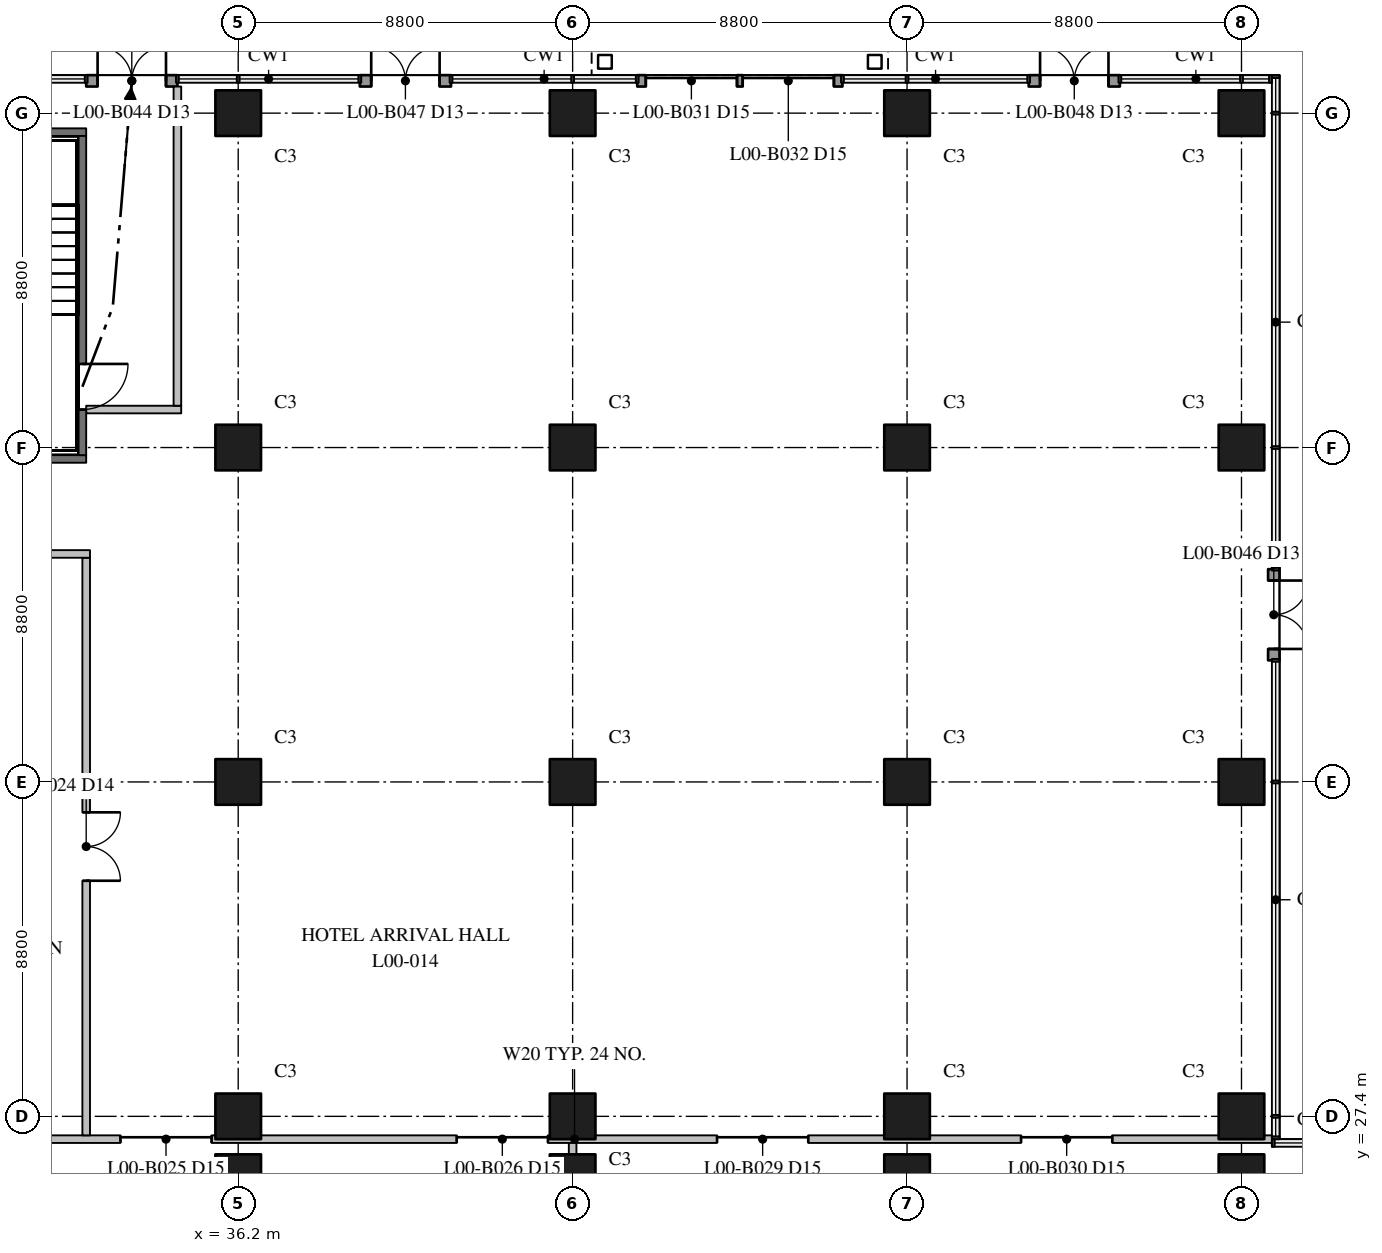
"""IFC4 building model, lengths in metres.
Left out: names, types, materials, properties, quantities, classifications, styles, units other than length and angle.
Written with IfcOpenShell. Run it as: python <this file> out.ifc"""

import sys

from ifc_helpers import new_model, si_unit, direction, frame, frame_2d, origin, origin_2d, place, context, subcontext, project, spatial, rectangle, hollow_rectangle, extrude, element, fill, save


model = new_model("IFC4")
c1 = context("Model", 3, precision=1e-05, world=origin(), true_north=direction((0.0, 1.0)))
c2 = subcontext(c1, "Body", "Model", "MODEL_VIEW")
j1 = project(units=[si_unit("LENGTHUNIT", "METRE"), si_unit("PLANEANGLEUNIT", "RADIAN")], contexts=[c1])
p1 = place(None, origin())
s1 = spatial("IfcSite", under=j1, at=p1, CompositionType="ELEMENT")
p2 = place(p1, origin())
s2 = spatial("IfcBuilding", under=s1, at=p2, CompositionType="ELEMENT")
p3 = place(p2, origin())
s3 = spatial("IfcBuildingStorey", under=s2, at=p3, CompositionType="ELEMENT", Elevation=0.0)
for number, where, z_axis, x_axis in (
    (1, (36.2, 25.8, 0.0), (0.0, 0.0, 1.0), (1.0, 0.0, 0.0)),
    (2, (45.0, 25.8, 0.0), (0.0, 0.0, 1.0), (1.0, 0.0, 0.0)),
    (3, (53.8, 25.8, 0.0), (0.0, 0.0, 1.0), (1.0, 0.0, 0.0)),
    (4, (62.6, 25.8, 0.0), (0.0, 0.0, 1.0), (1.0, 0.0, 0.0)),
    (5, (36.2, 27.4, 0.0), (0.0, 0.0, 1.0), (1.0, 0.0, 0.0)),
    (6, (36.2, 36.2, 0.0), (0.0, 0.0, 1.0), (1.0, 0.0, 0.0)),
    (7, (36.2, 45.0, 0.0), (0.0, 0.0, 1.0), (1.0, 0.0, 0.0)),
    (8, (36.2, 53.8, 0.0), (0.0, 0.0, 1.0), (1.0, 0.0, 0.0)),
    (9, (45.0, 27.4, 0.0), (0.0, 0.0, 1.0), (1.0, 0.0, 0.0)),
    (10, (45.0, 36.2, 0.0), (0.0, 0.0, 1.0), (1.0, 0.0, 0.0)),
    (11, (45.0, 45.0, 0.0), (0.0, 0.0, 1.0), (1.0, 0.0, 0.0)),
    (12, (45.0, 53.8, 0.0), (0.0, 0.0, 1.0), (1.0, 0.0, 0.0)),
    (13, (53.8, 27.4, 0.0), (0.0, 0.0, 1.0), (1.0, 0.0, 0.0)),
    (14, (53.8, 36.2, 0.0), (0.0, 0.0, 1.0), (1.0, 0.0, 0.0)),
    (15, (53.8, 45.0, 0.0), (0.0, 0.0, 1.0), (1.0, 0.0, 0.0)),
    (16, (53.8, 53.8, 0.0), (0.0, 0.0, 1.0), (1.0, 0.0, 0.0)),
    (17, (62.6, 27.4, 0.0), (0.0, 0.0, 1.0), (1.0, 0.0, 0.0)),
    (18, (62.6, 36.2, 0.0), (0.0, 0.0, 1.0), (1.0, 0.0, 0.0)),
    (19, (62.6, 45.0, 0.0), (0.0, 0.0, 1.0), (1.0, 0.0, 0.0)),
    (20, (62.6, 53.8, 0.0), (0.0, 0.0, 1.0), (1.0, 0.0, 0.0)),
):
    element("IfcColumn", number, at=place(p3, frame(where, z_axis=z_axis, x_axis=x_axis)), inside=s3, PredefinedType="COLUMN", context=c2, shape_type="SweptSolid", body=[
        extrude(rectangle(XDim=1.2, YDim=1.2, at=origin_2d()), origin(), (0.0, 0.0, 1.0), 7.5),
    ])
for number, where, z_axis, x_axis in (
    (21, (52.95, 55.15, 0.0), (0.0, 0.0, 1.0), (1.0, 0.0, 0.0)),
    (22, (45.85, 55.15, 0.0), (0.0, 0.0, 1.0), (1.0, 0.0, 0.0)),
):
    element("IfcColumn", number, at=place(p3, frame(where, z_axis=z_axis, x_axis=x_axis)), inside=s3, PredefinedType="COLUMN", context=c2, shape_type="SweptSolid", body=[
        extrude(hollow_rectangle(XDim=0.356, YDim=0.356, WallThickness=0.013, at=origin_2d()), origin(), (0.0, 0.0, 1.0), 7.1),
    ])
p4 = place(p3, frame((27.8, 44.7, 0.0), z_axis=(0.0, 0.0, 1.0), x_axis=(1.0, 0.0, 0.0)))
e23 = element("IfcWall", 23, at=p4, inside=s3, PredefinedType="SHEAR", context=c2, shape_type="SweptSolid", body=[
    extrude(rectangle(XDim=4.4, YDim=0.2, at=frame_2d((2.2, 0.0))), origin(), (0.0, 0.0, 1.0), 7.1),
])
p5 = place(p4, frame((1.6, 0.0, 0.0)))
e24 = element("IfcOpeningElement", 24, at=p5, cuts=e23, PredefinedType="OPENING", context=c2, shape_type="SweptSolid", body=[
    extrude(rectangle(XDim=1.2, YDim=2.1, at=frame_2d((0.6, 1.05))), frame((0.0, 0.11, 0.0), z_axis=(0.0, -1.0, 0.0), x_axis=(1.0, 0.0, 0.0)), (0.0, 0.0, 1.0), 0.22),
])
p6 = place(p3, frame((27.8, 53.3, 0.0), z_axis=(0.0, 0.0, 1.0), x_axis=(1.0, 0.0, 0.0)))
e25 = element("IfcWall", 25, at=p6, inside=s3, PredefinedType="SHEAR", context=c2, shape_type="SweptSolid", body=[
    extrude(rectangle(XDim=4.4, YDim=0.2, at=frame_2d((2.2, 0.0))), origin(), (0.0, 0.0, 1.0), 7.1),
])
p7 = place(p3, frame((32.1, 44.8, 0.0), z_axis=(0.0, 0.0, 1.0), x_axis=(0.0, 1.0, 0.0)))
e26 = element("IfcWall", 26, at=p7, inside=s3, PredefinedType="SHEAR", context=c2, shape_type="SweptSolid", body=[
    extrude(rectangle(XDim=8.4, YDim=0.2, at=frame_2d((4.2, 0.0))), origin(), (0.0, 0.0, 1.0), 7.1),
])
p8 = place(p7, frame((1.2, 0.0, 0.0)))
e27 = element("IfcOpeningElement", 27, at=p8, cuts=e26, PredefinedType="OPENING", context=c2, shape_type="SweptSolid", body=[
    extrude(rectangle(XDim=1.2, YDim=2.1, at=frame_2d((0.6, 1.05))), frame((0.0, 0.11, 0.0), z_axis=(0.0, -1.0, 0.0), x_axis=(1.0, 0.0, 0.0)), (0.0, 0.0, 1.0), 0.22),
])
p9 = place(p3, frame((32.2, 46.0, 0.0), z_axis=(0.0, 0.0, 1.0), x_axis=(1.0, 0.0, 0.0)))
e28 = element("IfcWall", 28, at=p9, inside=s3, PredefinedType="PARTITIONING", context=c2, shape_type="SweptSolid", body=[
    extrude(rectangle(XDim=2.5, YDim=0.2, at=frame_2d((1.25, 0.0))), origin(), (0.0, 0.0, 1.0), 7.1),
])
p10 = place(p3, frame((26.7, 26.8, 0.0), z_axis=(0.0, 0.0, 1.0), x_axis=(1.0, 0.0, 0.0)))
e29 = element("IfcWall", 29, at=p10, inside=s3, PredefinedType="PARTITIONING", context=c2, shape_type="SweptSolid", body=[
    extrude(rectangle(XDim=36.7, YDim=0.2, at=frame_2d((18.35, 0.0))), origin(), (0.0, 0.0, 1.0), 7.1),
])
p11 = place(p10, frame((6.4, 0.0, 0.0)))
e30 = element("IfcOpeningElement", 30, at=p11, cuts=e29, PredefinedType="OPENING", context=c2, shape_type="SweptSolid", body=[
    extrude(rectangle(XDim=2.4, YDim=2.4, at=frame_2d((1.2, 1.2))), frame((0.0, 0.11, 0.0), z_axis=(0.0, -1.0, 0.0), x_axis=(1.0, 0.0, 0.0)), (0.0, 0.0, 1.0), 0.22),
])
p12 = place(p10, frame((15.25, 0.0, 0.0)))
e31 = element("IfcOpeningElement", 31, at=p12, cuts=e29, PredefinedType="OPENING", context=c2, shape_type="SweptSolid", body=[
    extrude(rectangle(XDim=2.4, YDim=2.4, at=frame_2d((1.2, 1.2))), frame((0.0, 0.11, 0.0), z_axis=(0.0, -1.0, 0.0), x_axis=(1.0, 0.0, 0.0)), (0.0, 0.0, 1.0), 0.22),
])
p13 = place(p10, frame((22.1, 0.0, 0.0)))
e32 = element("IfcOpeningElement", 32, at=p13, cuts=e29, PredefinedType="OPENING", context=c2, shape_type="SweptSolid", body=[
    extrude(rectangle(XDim=2.4, YDim=2.4, at=frame_2d((1.2, 1.2))), frame((0.0, 0.11, 0.0), z_axis=(0.0, -1.0, 0.0), x_axis=(1.0, 0.0, 0.0)), (0.0, 0.0, 1.0), 0.22),
])
p14 = place(p10, frame((30.1, 0.0, 0.0)))
e33 = element("IfcOpeningElement", 33, at=p14, cuts=e29, PredefinedType="OPENING", context=c2, shape_type="SweptSolid", body=[
    extrude(rectangle(XDim=2.4, YDim=2.4, at=frame_2d((1.2, 1.2))), frame((0.0, 0.11, 0.0), z_axis=(0.0, -1.0, 0.0), x_axis=(1.0, 0.0, 0.0)), (0.0, 0.0, 1.0), 0.22),
])
p15 = place(p3, frame((27.8, 42.2, 0.0), z_axis=(0.0, 0.0, 1.0), x_axis=(1.0, 0.0, 0.0)))
e34 = element("IfcWall", 34, at=p15, inside=s3, PredefinedType="PARTITIONING", context=c2, shape_type="SweptSolid", body=[
    extrude(rectangle(XDim=4.5, YDim=0.2, at=frame_2d((2.25, 0.0))), origin(), (0.0, 0.0, 1.0), 7.1),
])
p16 = place(p3, frame((34.6, 46.1, 0.0), z_axis=(0.0, 0.0, 1.0), x_axis=(0.0, 1.0, 0.0)))
e35 = element("IfcWall", 35, at=p16, inside=s3, PredefinedType="PARTITIONING", context=c2, shape_type="SweptSolid", body=[
    extrude(rectangle(XDim=8.4, YDim=0.2, at=frame_2d((4.2, 0.0))), origin(), (0.0, 0.0, 1.0), 7.1),
])
p17 = place(p3, frame((45.0, 18.3, 0.0), z_axis=(0.0, 0.0, 1.0), x_axis=(0.0, 1.0, 0.0)))
e36 = element("IfcWall", 36, at=p17, inside=s3, PredefinedType="PARTITIONING", context=c2, shape_type="SweptSolid", body=[
    extrude(rectangle(XDim=8.4, YDim=0.2, at=frame_2d((4.2, 0.0))), origin(), (0.0, 0.0, 1.0), 7.1),
])
p18 = place(p17, frame((4.4, 0.0, 0.0)))
e37 = element("IfcOpeningElement", 37, at=p18, cuts=e36, PredefinedType="OPENING", context=c2, shape_type="SweptSolid", body=[
    extrude(rectangle(XDim=2.4, YDim=2.4, at=frame_2d((1.2, 1.2))), frame((0.0, 0.11, 0.0), z_axis=(0.0, -1.0, 0.0), x_axis=(1.0, 0.0, 0.0)), (0.0, 0.0, 1.0), 0.22),
])
p19 = place(p3, frame((32.2, 26.9, 0.0), z_axis=(0.0, 0.0, 1.0), x_axis=(0.0, 1.0, 0.0)))
e38 = element("IfcWall", 38, at=p19, inside=s3, PredefinedType="PARTITIONING", context=c2, shape_type="SweptSolid", body=[
    extrude(rectangle(XDim=15.2, YDim=0.2, at=frame_2d((7.6, 0.0))), origin(), (0.0, 0.0, 1.0), 7.1),
])
p20 = place(p19, frame((6.7, 0.0, 0.0)))
e39 = element("IfcOpeningElement", 39, at=p20, cuts=e38, PredefinedType="OPENING", context=c2, shape_type="SweptSolid", body=[
    extrude(rectangle(XDim=1.8, YDim=2.4, at=frame_2d((0.9, 1.2))), frame((0.0, 0.11, 0.0), z_axis=(0.0, -1.0, 0.0), x_axis=(1.0, 0.0, 0.0)), (0.0, 0.0, 1.0), 0.22),
])
p21 = place(p3, frame((46.7, 54.65, 0.0), z_axis=(0.0, 0.0, 1.0), x_axis=(1.0, 0.0, 0.0)))
e40 = element("IfcWall", 40, at=p21, inside=s3, PredefinedType="STANDARD", context=c2, shape_type="SweptSolid", body=[
    extrude(rectangle(XDim=5.4, YDim=0.3, at=frame_2d((2.7, 0.0))), origin(), (0.0, 0.0, 1.0), 7.1),
])
p22 = place(p21, frame((0.225, 0.0, 0.0)))
e41 = element("IfcOpeningElement", 41, at=p22, cuts=e40, PredefinedType="OPENING", context=c2, shape_type="SweptSolid", body=[
    extrude(rectangle(XDim=2.4, YDim=2.4, at=frame_2d((1.2, 1.2))), frame((0.0, 0.16, 0.0), z_axis=(0.0, -1.0, 0.0), x_axis=(1.0, 0.0, 0.0)), (0.0, 0.0, 1.0), 0.32),
])
p23 = place(p21, frame((2.775, 0.0, 0.0)))
e42 = element("IfcOpeningElement", 42, at=p23, cuts=e40, PredefinedType="OPENING", context=c2, shape_type="SweptSolid", body=[
    extrude(rectangle(XDim=2.4, YDim=2.4, at=frame_2d((1.2, 1.2))), frame((0.0, 0.16, 0.0), z_axis=(0.0, -1.0, 0.0), x_axis=(1.0, 0.0, 0.0)), (0.0, 0.0, 1.0), 0.32),
])
p24 = place(p3, frame((32.2, 54.65, 0.0), z_axis=(0.0, 0.0, 1.0), x_axis=(1.0, 0.0, 0.0)))
e43 = element("IfcWall", 43, at=p24, inside=s3, PredefinedType="STANDARD", context=c2, shape_type="SweptSolid", body=[
    extrude(rectangle(XDim=2.4, YDim=0.3, at=frame_2d((1.2, 0.0))), origin(), (0.0, 0.0, 1.0), 7.1),
])
p25 = place(p24, frame((0.3, 0.0, 0.0)))
e44 = element("IfcOpeningElement", 44, at=p25, cuts=e43, PredefinedType="OPENING", context=c2, shape_type="SweptSolid", body=[
    extrude(rectangle(XDim=1.8, YDim=2.1, at=frame_2d((0.9, 1.05))), frame((0.0, 0.16, 0.0), z_axis=(0.0, -1.0, 0.0), x_axis=(1.0, 0.0, 0.0)), (0.0, 0.0, 1.0), 0.32),
])
p26 = place(p3, frame((63.45, 41.8, 0.0), z_axis=(0.0, 0.0, 1.0), x_axis=(0.0, -1.0, 0.0)))
e45 = element("IfcWall", 45, at=p26, inside=s3, PredefinedType="STANDARD", context=c2, shape_type="SweptSolid", body=[
    extrude(rectangle(XDim=2.4, YDim=0.3, at=frame_2d((1.2, 0.0))), origin(), (0.0, 0.0, 1.0), 7.1),
])
p27 = place(p26, frame((0.3, 0.0, 0.0)))
e46 = element("IfcOpeningElement", 46, at=p27, cuts=e45, PredefinedType="OPENING", context=c2, shape_type="SweptSolid", body=[
    extrude(rectangle(XDim=1.8, YDim=2.1, at=frame_2d((0.9, 1.05))), frame((0.0, 0.16, 0.0), z_axis=(0.0, -1.0, 0.0), x_axis=(1.0, 0.0, 0.0)), (0.0, 0.0, 1.0), 0.32),
])
p28 = place(p3, frame((39.4, 54.65, 0.0), z_axis=(0.0, 0.0, 1.0), x_axis=(1.0, 0.0, 0.0)))
e47 = element("IfcWall", 47, at=p28, inside=s3, PredefinedType="STANDARD", context=c2, shape_type="SweptSolid", body=[
    extrude(rectangle(XDim=2.4, YDim=0.3, at=frame_2d((1.2, 0.0))), origin(), (0.0, 0.0, 1.0), 7.1),
])
p29 = place(p28, frame((0.3, 0.0, 0.0)))
e48 = element("IfcOpeningElement", 48, at=p29, cuts=e47, PredefinedType="OPENING", context=c2, shape_type="SweptSolid", body=[
    extrude(rectangle(XDim=1.8, YDim=2.1, at=frame_2d((0.9, 1.05))), frame((0.0, 0.16, 0.0), z_axis=(0.0, -1.0, 0.0), x_axis=(1.0, 0.0, 0.0)), (0.0, 0.0, 1.0), 0.32),
])
p30 = place(p3, frame((57.0, 54.65, 0.0), z_axis=(0.0, 0.0, 1.0), x_axis=(1.0, 0.0, 0.0)))
e49 = element("IfcWall", 49, at=p30, inside=s3, PredefinedType="STANDARD", context=c2, shape_type="SweptSolid", body=[
    extrude(rectangle(XDim=2.4, YDim=0.3, at=frame_2d((1.2, 0.0))), origin(), (0.0, 0.0, 1.0), 7.1),
])
p31 = place(p30, frame((0.3, 0.0, 0.0)))
e50 = element("IfcOpeningElement", 50, at=p31, cuts=e49, PredefinedType="OPENING", context=c2, shape_type="SweptSolid", body=[
    extrude(rectangle(XDim=1.8, YDim=2.1, at=frame_2d((0.9, 1.05))), frame((0.0, 0.16, 0.0), z_axis=(0.0, -1.0, 0.0), x_axis=(1.0, 0.0, 0.0)), (0.0, 0.0, 1.0), 0.32),
])
p32 = place(p8, frame((1.2, 0.0, 0.0), z_axis=(0.0, 0.0, 1.0), x_axis=(-1.0, 0.0, 0.0)))
e51 = element("IfcDoor", 51, at=p32, inside=s3, OperationType="SINGLE_SWING_RIGHT", PredefinedType="DOOR", context=c2, shape_type="SweptSolid", body=[
    extrude(rectangle(XDim=1.2, YDim=2.1, at=frame_2d((0.6, 1.05))), frame((0.0, 0.025, 0.0), z_axis=(0.0, -1.0, 0.0), x_axis=(1.0, 0.0, 0.0)), (0.0, 0.0, 1.0), 0.05),
])
fill(e27, e51)
p33 = place(p20, frame((1.8, 0.0, 0.0), z_axis=(0.0, 0.0, 1.0), x_axis=(-1.0, 0.0, 0.0)))
e52 = element("IfcDoor", 52, at=p33, inside=s3, OperationType="DOUBLE_DOOR_SINGLE_SWING", PredefinedType="DOOR", context=c2, shape_type="SweptSolid", body=[
    extrude(rectangle(XDim=1.8, YDim=2.4, at=frame_2d((0.9, 1.2))), frame((0.0, 0.025, 0.0), z_axis=(0.0, -1.0, 0.0), x_axis=(1.0, 0.0, 0.0)), (0.0, 0.0, 1.0), 0.05),
])
fill(e39, e52)
p34 = place(p11, origin())
e53 = element("IfcDoor", 53, at=p34, inside=s3, OperationType="DOUBLE_DOOR_SLIDING", PredefinedType="DOOR", context=c2, shape_type="SweptSolid", body=[
    extrude(rectangle(XDim=2.4, YDim=2.4, at=frame_2d((1.2, 1.2))), frame((0.0, 0.025, 0.0), z_axis=(0.0, -1.0, 0.0), x_axis=(1.0, 0.0, 0.0)), (0.0, 0.0, 1.0), 0.05),
])
fill(e30, e53)
p35 = place(p12, origin())
e54 = element("IfcDoor", 54, at=p35, inside=s3, OperationType="DOUBLE_DOOR_SLIDING", PredefinedType="DOOR", context=c2, shape_type="SweptSolid", body=[
    extrude(rectangle(XDim=2.4, YDim=2.4, at=frame_2d((1.2, 1.2))), frame((0.0, 0.025, 0.0), z_axis=(0.0, -1.0, 0.0), x_axis=(1.0, 0.0, 0.0)), (0.0, 0.0, 1.0), 0.05),
])
fill(e31, e54)
p36 = place(p13, origin())
e55 = element("IfcDoor", 55, at=p36, inside=s3, OperationType="DOUBLE_DOOR_SLIDING", PredefinedType="DOOR", context=c2, shape_type="SweptSolid", body=[
    extrude(rectangle(XDim=2.4, YDim=2.4, at=frame_2d((1.2, 1.2))), frame((0.0, 0.025, 0.0), z_axis=(0.0, -1.0, 0.0), x_axis=(1.0, 0.0, 0.0)), (0.0, 0.0, 1.0), 0.05),
])
fill(e32, e55)
p37 = place(p14, origin())
e56 = element("IfcDoor", 56, at=p37, inside=s3, OperationType="DOUBLE_DOOR_SLIDING", PredefinedType="DOOR", context=c2, shape_type="SweptSolid", body=[
    extrude(rectangle(XDim=2.4, YDim=2.4, at=frame_2d((1.2, 1.2))), frame((0.0, 0.025, 0.0), z_axis=(0.0, -1.0, 0.0), x_axis=(1.0, 0.0, 0.0)), (0.0, 0.0, 1.0), 0.05),
])
fill(e33, e56)
p38 = place(p22, origin())
e57 = element("IfcDoor", 57, at=p38, inside=s3, OperationType="DOUBLE_DOOR_SLIDING", PredefinedType="DOOR", context=c2, shape_type="SweptSolid", body=[
    extrude(rectangle(XDim=2.4, YDim=2.4, at=frame_2d((1.2, 1.2))), frame((0.0, 0.025, 0.0), z_axis=(0.0, -1.0, 0.0), x_axis=(1.0, 0.0, 0.0)), (0.0, 0.0, 1.0), 0.05),
])
fill(e41, e57)
p39 = place(p23, origin())
e58 = element("IfcDoor", 58, at=p39, inside=s3, OperationType="DOUBLE_DOOR_SLIDING", PredefinedType="DOOR", context=c2, shape_type="SweptSolid", body=[
    extrude(rectangle(XDim=2.4, YDim=2.4, at=frame_2d((1.2, 1.2))), frame((0.0, 0.025, 0.0), z_axis=(0.0, -1.0, 0.0), x_axis=(1.0, 0.0, 0.0)), (0.0, 0.0, 1.0), 0.05),
])
fill(e42, e58)
p40 = place(p25, origin())
e59 = element("IfcDoor", 59, at=p40, inside=s3, OperationType="DOUBLE_DOOR_SINGLE_SWING", PredefinedType="DOOR", context=c2, shape_type="SweptSolid", body=[
    extrude(rectangle(XDim=1.8, YDim=2.1, at=frame_2d((0.9, 1.05))), frame((0.0, 0.025, 0.0), z_axis=(0.0, -1.0, 0.0), x_axis=(1.0, 0.0, 0.0)), (0.0, 0.0, 1.0), 0.05),
])
fill(e44, e59)
p41 = place(p27, origin())
e60 = element("IfcDoor", 60, at=p41, inside=s3, OperationType="DOUBLE_DOOR_SINGLE_SWING", PredefinedType="DOOR", context=c2, shape_type="SweptSolid", body=[
    extrude(rectangle(XDim=1.8, YDim=2.1, at=frame_2d((0.9, 1.05))), frame((0.0, 0.025, 0.0), z_axis=(0.0, -1.0, 0.0), x_axis=(1.0, 0.0, 0.0)), (0.0, 0.0, 1.0), 0.05),
])
fill(e46, e60)
p42 = place(p29, origin())
e61 = element("IfcDoor", 61, at=p42, inside=s3, OperationType="DOUBLE_DOOR_SINGLE_SWING", PredefinedType="DOOR", context=c2, shape_type="SweptSolid", body=[
    extrude(rectangle(XDim=1.8, YDim=2.1, at=frame_2d((0.9, 1.05))), frame((0.0, 0.025, 0.0), z_axis=(0.0, -1.0, 0.0), x_axis=(1.0, 0.0, 0.0)), (0.0, 0.0, 1.0), 0.05),
])
fill(e48, e61)
p43 = place(p31, origin())
e62 = element("IfcDoor", 62, at=p43, inside=s3, OperationType="DOUBLE_DOOR_SINGLE_SWING", PredefinedType="DOOR", context=c2, shape_type="SweptSolid", body=[
    extrude(rectangle(XDim=1.8, YDim=2.1, at=frame_2d((0.9, 1.05))), frame((0.0, 0.025, 0.0), z_axis=(0.0, -1.0, 0.0), x_axis=(1.0, 0.0, 0.0)), (0.0, 0.0, 1.0), 0.05),
])
fill(e50, e62)
save(model, sys.argv[1])
